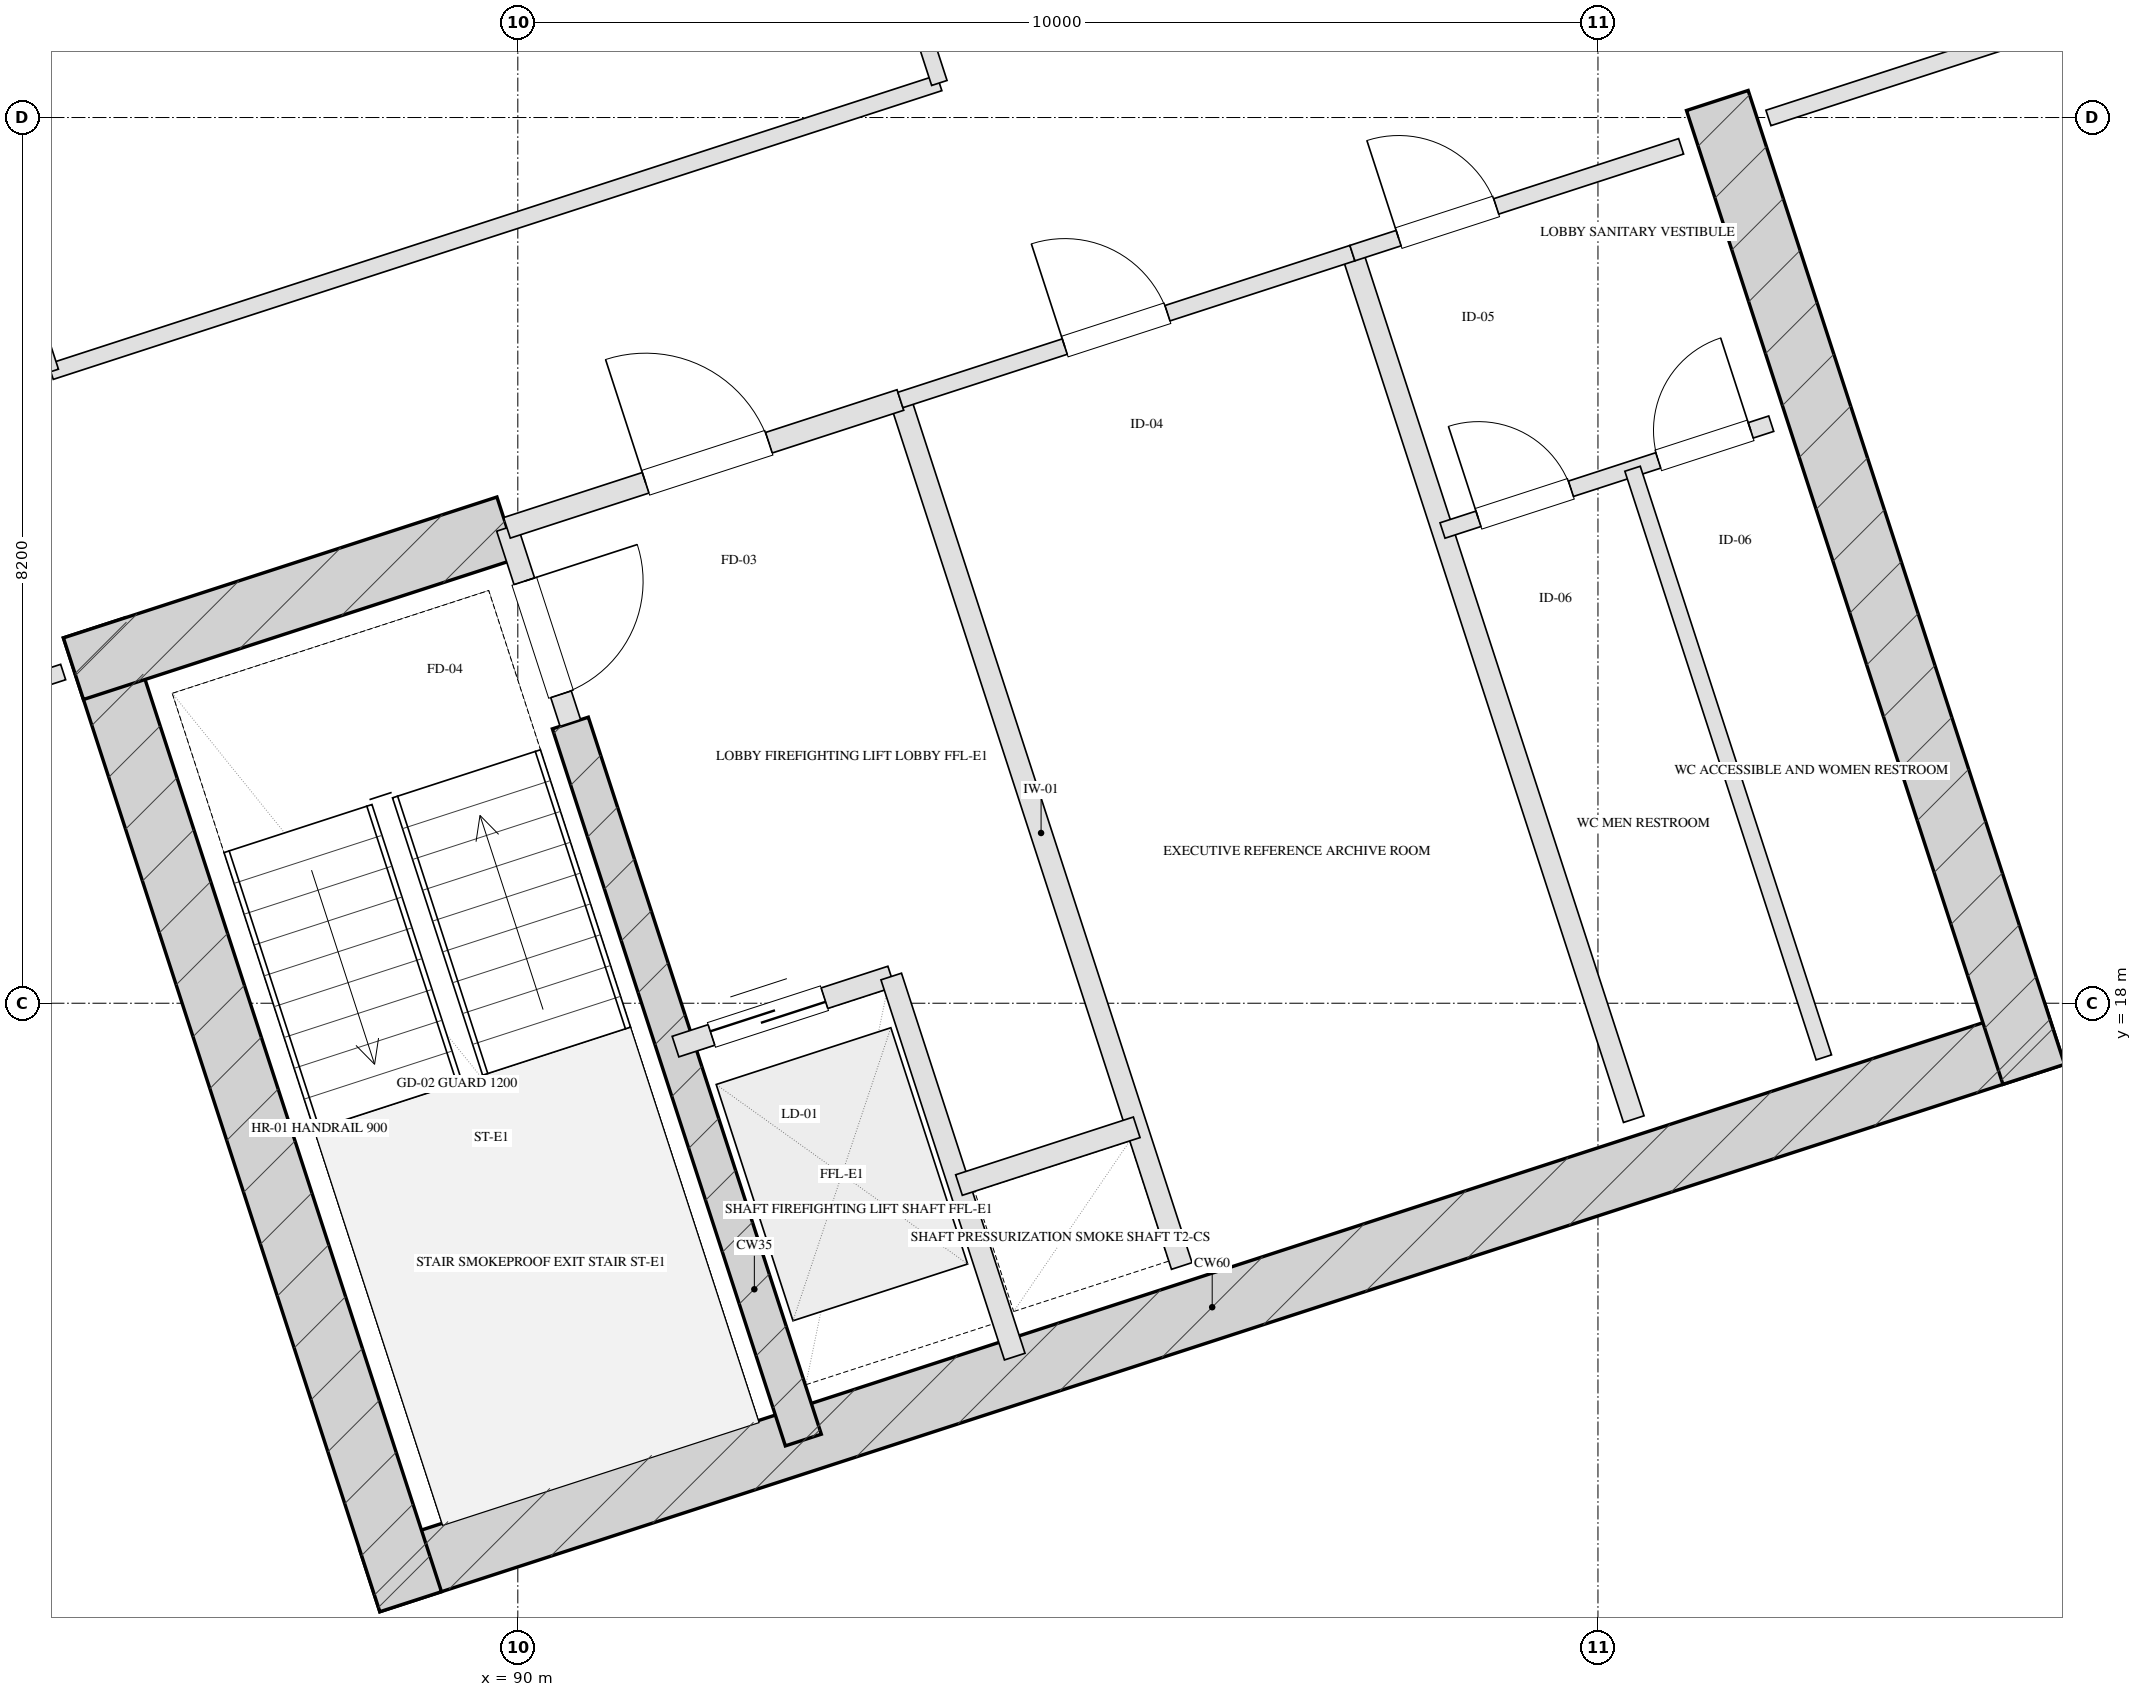
"""IFC4 building model, lengths in metres.
Left out: names, types, materials, properties, quantities, classifications, styles, units other than length and angle.
Written with IfcOpenShell. Run it as: python <this file> out.ifc"""

import sys

from ifc_helpers import new_model, si_unit, direction, frame, frame_2d, origin, place, context, subcontext, project, spatial, rectangle, extrude, element, fill, save


model = new_model("IFC4")
c1 = context("Model", 3, precision=1e-05, world=origin(), true_north=direction((0.0, 1.0)))
c2 = subcontext(c1, "Body", "Model", "MODEL_VIEW")
j1 = project(units=[si_unit("LENGTHUNIT", "METRE"), si_unit("PLANEANGLEUNIT", "RADIAN")], contexts=[c1])
p1 = place(None, origin())
s1 = spatial("IfcSite", under=j1, at=p1, CompositionType="ELEMENT")
p2 = place(p1, origin())
s2 = spatial("IfcBuilding", under=s1, at=p2, CompositionType="ELEMENT")
p3 = place(p2, frame((0.0, 0.0, 96.6)))
s3 = spatial("IfcBuildingStorey", under=s2, at=p3, CompositionType="ELEMENT", Elevation=96.6)
p4 = place(p3, frame((88.63, 12.652, 0.0), z_axis=(0.0, 0.0, 1.0), x_axis=(0.95105714907, 0.309015046886, 0.0)))
e1 = element("IfcWall", 1, at=p4, inside=s3, PredefinedType="SHEAR", context=c2, shape_type="SweptSolid", body=[
    extrude(rectangle(XDim=16.4, YDim=0.6, at=frame_2d((8.2, 0.0))), origin(), (0.0, 0.0, 1.0), 3.45),
])
p5 = place(p3, frame((86.078, 21.475, 0.0), z_axis=(0.0, 0.0, 1.0), x_axis=(0.309017938678, -0.951056209472, 0.0)))
e2 = element("IfcWall", 2, at=p5, inside=s3, PredefinedType="SHEAR", context=c2, shape_type="SweptSolid", body=[
    extrude(rectangle(XDim=9.48, YDim=0.6, at=frame_2d((4.74, 0.0))), origin(), (0.0, 0.0, 1.0), 3.45),
])
p6 = place(p3, frame((101.105, 26.358, 0.0), z_axis=(0.0, 0.0, 1.0), x_axis=(0.309010370028, -0.95105866865, 0.0)))
e3 = element("IfcWall", 3, at=p6, inside=s3, PredefinedType="SHEAR", context=c2, shape_type="SweptSolid", body=[
    extrude(rectangle(XDim=9.48, YDim=0.6, at=frame_2d((4.74, 0.0))), origin(), (0.0, 0.0, 1.0), 3.45),
])
p7 = place(p3, frame((90.486, 20.594, 0.0), z_axis=(0.0, 0.0, 1.0), x_axis=(0.309020428229, -0.951055400562, 0.0)))
e4 = element("IfcWall", 4, at=p7, inside=s3, PredefinedType="SHEAR", context=c2, shape_type="SweptSolid", body=[
    extrude(rectangle(XDim=6.98, YDim=0.35, at=frame_2d((3.49, 0.0))), origin(), (0.0, 0.0, 1.0), 3.45),
])
p8 = place(p3, frame((85.886, 21.097, 0.0), z_axis=(0.0, 0.0, 1.0), x_axis=(0.951068073652, 0.308981422225, 0.0)))
e5 = element("IfcWall", 5, at=p8, inside=s3, PredefinedType="SHEAR", context=c2, shape_type="SweptSolid", body=[
    extrude(rectangle(XDim=4.22, YDim=0.6, at=frame_2d((2.11, 0.0))), origin(), (0.0, 0.0, 1.0), 3.45),
])
p9 = place(p3, frame((99.284, 61.41, 0.0), z_axis=(0.0, 0.0, 1.0), x_axis=(0.309017542002, -0.95105633836, 0.0)))
e6 = element("IfcWall", 6, at=p9, inside=s3, PredefinedType="SOLIDWALL", context=c2, shape_type="SweptSolid", body=[
    extrude(rectangle(XDim=46.4, YDim=0.4, at=frame_2d((23.2, 0.0))), origin(), (0.0, 0.0, 1.0), 2.55),
])
p10 = place(p3, frame((111.953, 14.005, 0.0), z_axis=(0.0, 0.0, 1.0), x_axis=(-0.95105505922, -0.309021478754, 0.0)))
e7 = element("IfcWall", 7, at=p10, inside=s3, PredefinedType="SOLIDWALL", context=c2, shape_type="SweptSolid", body=[
    extrude(rectangle(XDim=29.4, YDim=0.4, at=frame_2d((14.7, 0.0))), origin(), (0.0, 0.0, 1.0), 2.55),
])
p11 = place(p3, frame((89.899, 22.401, 0.0), z_axis=(0.0, 0.0, 1.0), x_axis=(0.308932062672, -0.951084108086, 0.0)))
e8 = element("IfcWall", 8, at=p11, inside=s3, PredefinedType="PARTITIONING", context=c2, shape_type="SweptSolid", body=[
    extrude(rectangle(XDim=1.9, YDim=0.2, at=frame_2d((0.95, 0.0))), origin(), (0.0, 0.0, 1.0), 3.155),
])
p12 = place(p11, frame((0.52, 0.0, 0.0)))
e9 = element("IfcOpeningElement", 9, at=p12, cuts=e8, PredefinedType="OPENING", context=c2, shape_type="SweptSolid", body=[
    extrude(rectangle(XDim=1.1, YDim=2.05, at=frame_2d((0.55, 1.025))), frame((0.0, 0.11, 0.0), z_axis=(0.0, -1.0, 0.0), x_axis=(1.0, 0.0, 0.0)), (0.0, 0.0, 1.0), 0.22),
])
p13 = place(p3, frame((93.542, 23.585, 0.0), z_axis=(0.0, 0.0, 1.0), x_axis=(0.309042196757, -0.951048327176, 0.0)))
e10 = element("IfcWall", 10, at=p13, inside=s3, PredefinedType="PARTITIONING", context=c2, shape_type="SweptSolid", body=[
    extrude(rectangle(XDim=8.43, YDim=0.2, at=frame_2d((4.215, 0.0))), origin(), (0.0, 0.0, 1.0), 3.155),
])
p14 = place(p3, frame((89.899, 22.401, 0.0), z_axis=(0.0, 0.0, 1.0), x_axis=(0.951046716504, 0.309047153403, 0.0)))
e11 = element("IfcWall", 11, at=p14, inside=s3, PredefinedType="PARTITIONING", context=c2, shape_type="SweptSolid", body=[
    extrude(rectangle(XDim=3.83, YDim=0.2, at=frame_2d((1.915, 0.0))), origin(), (0.0, 0.0, 1.0), 3.155),
])
p15 = place(p14, frame((1.35, 0.0, 0.0)))
e12 = element("IfcOpeningElement", 12, at=p15, cuts=e11, PredefinedType="OPENING", context=c2, shape_type="SweptSolid", body=[
    extrude(rectangle(XDim=1.2, YDim=2.05, at=frame_2d((0.6, 1.025))), frame((0.0, 0.11, 0.0), z_axis=(0.0, -1.0, 0.0), x_axis=(1.0, 0.0, 0.0)), (0.0, 0.0, 1.0), 0.22),
])
p16 = place(p3, frame((91.46, 17.598, 0.0), z_axis=(0.0, 0.0, 1.0), x_axis=(0.951062257173, 0.308999325213, 0.0)))
e13 = element("IfcWall", 13, at=p16, inside=s3, PredefinedType="PARTITIONING", context=c2, shape_type="SweptSolid", body=[
    extrude(rectangle(XDim=2.1, YDim=0.2, at=frame_2d((1.05, 0.0))), origin(), (0.0, 0.0, 1.0), 3.155),
])
p17 = place(p16, frame((0.35, 0.0, 0.0)))
e14 = element("IfcOpeningElement", 14, at=p17, cuts=e13, PredefinedType="OPENING", context=c2, shape_type="SweptSolid", body=[
    extrude(rectangle(XDim=1.1, YDim=2.05, at=frame_2d((0.55, 1.025))), frame((0.0, 0.11, 0.0), z_axis=(0.0, -1.0, 0.0), x_axis=(1.0, 0.0, 0.0)), (0.0, 0.0, 1.0), 0.22),
])
p18 = place(p3, frame((93.457, 18.247, 0.0), z_axis=(0.0, 0.0, 1.0), x_axis=(0.3089935693, -0.951064127245, 0.0)))
e15 = element("IfcWall", 15, at=p18, inside=s3, PredefinedType="PARTITIONING", context=c2, shape_type="SweptSolid", body=[
    extrude(rectangle(XDim=3.7, YDim=0.2, at=frame_2d((1.85, 0.0))), origin(), (0.0, 0.0, 1.0), 3.155),
])
p19 = place(p3, frame((94.084, 16.317, 0.0), z_axis=(0.0, 0.0, 1.0), x_axis=(0.951041328149, 0.309063734775, 0.0)))
e16 = element("IfcWall", 16, at=p19, inside=s3, PredefinedType="PARTITIONING", context=c2, shape_type="SweptSolid", body=[
    extrude(rectangle(XDim=1.73, YDim=0.2, at=frame_2d((0.865, 0.0))), origin(), (0.0, 0.0, 1.0), 3.155),
])
p20 = place(p3, frame((97.727, 24.944, 0.0), z_axis=(0.0, 0.0, 1.0), x_axis=(0.309016001439, -0.951056838919, 0.0)))
e17 = element("IfcWall", 17, at=p20, inside=s3, PredefinedType="PARTITIONING", context=c2, shape_type="SweptSolid", body=[
    extrude(rectangle(XDim=8.43, YDim=0.2, at=frame_2d((4.215, 0.0))), origin(), (0.0, 0.0, 1.0), 3.155),
])
p21 = place(p3, frame((93.542, 23.585, 0.0), z_axis=(0.0, 0.0, 1.0), x_axis=(0.951063829732, 0.308994485023, 0.0)))
e18 = element("IfcWall", 18, at=p21, inside=s3, PredefinedType="PARTITIONING", context=c2, shape_type="SweptSolid", body=[
    extrude(rectangle(XDim=4.4, YDim=0.15, at=frame_2d((2.2, 0.0))), origin(), (0.0, 0.0, 1.0), 3.155),
])
p22 = place(p21, frame((1.6, 0.0, 0.0)))
e19 = element("IfcOpeningElement", 19, at=p22, cuts=e18, PredefinedType="OPENING", context=c2, shape_type="SweptSolid", body=[
    extrude(rectangle(XDim=1.0, YDim=2.05, at=frame_2d((0.5, 1.025))), frame((0.0, 0.085, 0.0), z_axis=(0.0, -1.0, 0.0), x_axis=(1.0, 0.0, 0.0)), (0.0, 0.0, 1.0), 0.17),
])
p23 = place(p3, frame((97.727, 24.944, 0.0), z_axis=(0.0, 0.0, 1.0), x_axis=(0.951036872128, 0.309077446369, 0.0)))
e20 = element("IfcWall", 20, at=p23, inside=s3, PredefinedType="PARTITIONING", context=c2, shape_type="SweptSolid", body=[
    extrude(rectangle(XDim=3.2, YDim=0.15, at=frame_2d((1.6, 0.0))), origin(), (0.0, 0.0, 1.0), 3.155),
])
p24 = place(p23, frame((0.45, 0.0, 0.0)))
e21 = element("IfcOpeningElement", 21, at=p24, cuts=e20, PredefinedType="OPENING", context=c2, shape_type="SweptSolid", body=[
    extrude(rectangle(XDim=0.95, YDim=2.05, at=frame_2d((0.475, 1.025))), frame((0.0, 0.085, 0.0), z_axis=(0.0, -1.0, 0.0), x_axis=(1.0, 0.0, 0.0)), (0.0, 0.0, 1.0), 0.17),
])
p25 = place(p3, frame((98.561, 22.376, 0.0), z_axis=(0.0, 0.0, 1.0), x_axis=(0.95104415986, 0.309055020985, 0.0)))
e22 = element("IfcWall", 22, at=p25, inside=s3, PredefinedType="PARTITIONING", context=c2, shape_type="SweptSolid", body=[
    extrude(rectangle(XDim=3.2, YDim=0.15, at=frame_2d((1.6, 0.0))), origin(), (0.0, 0.0, 1.0), 3.155),
])
p26 = place(p25, frame((0.35, 0.0, 0.0)))
e23 = element("IfcOpeningElement", 23, at=p26, cuts=e22, PredefinedType="OPENING", context=c2, shape_type="SweptSolid", body=[
    extrude(rectangle(XDim=0.9, YDim=2.05, at=frame_2d((0.45, 1.025))), frame((0.0, 0.085, 0.0), z_axis=(0.0, -1.0, 0.0), x_axis=(1.0, 0.0, 0.0)), (0.0, 0.0, 1.0), 0.17),
])
p27 = place(p25, frame((2.1, 0.0, 0.0)))
e24 = element("IfcOpeningElement", 24, at=p27, cuts=e22, PredefinedType="OPENING", context=c2, shape_type="SweptSolid", body=[
    extrude(rectangle(XDim=0.9, YDim=2.05, at=frame_2d((0.45, 1.025))), frame((0.0, 0.085, 0.0), z_axis=(0.0, -1.0, 0.0), x_axis=(1.0, 0.0, 0.0)), (0.0, 0.0, 1.0), 0.17),
])
p28 = place(p3, frame((100.32, 22.948, 0.0), z_axis=(0.0, 0.0, 1.0), x_axis=(0.309035009867, -0.951050662518, 0.0)))
e25 = element("IfcWall", 25, at=p28, inside=s3, PredefinedType="PARTITIONING", context=c2, shape_type="SweptSolid", body=[
    extrude(rectangle(XDim=5.73, YDim=0.15, at=frame_2d((2.865, 0.0))), origin(), (0.0, 0.0, 1.0), 3.155),
])
p29 = place(p3, frame((77.136, 18.254, 0.0), z_axis=(0.0, 0.0, 1.0), x_axis=(0.951057133767, 0.309015093986, 0.0)))
e26 = element("IfcWall", 26, at=p29, inside=s3, PredefinedType="PARTITIONING", context=c2, shape_type="SweptSolid", body=[
    extrude(rectangle(XDim=9.1, YDim=0.15, at=frame_2d((4.55, 0.0))), origin(), (0.0, 0.0, 1.0), 3.155),
])
p30 = place(p29, frame((3.822, 0.0, 0.0)))
e27 = element("IfcOpeningElement", 27, at=p30, cuts=e26, PredefinedType="OPENING", context=c2, shape_type="SweptSolid", body=[
    extrude(rectangle(XDim=1.0, YDim=2.05, at=frame_2d((0.5, 1.025))), frame((0.0, 0.085, 0.0), z_axis=(0.0, -1.0, 0.0), x_axis=(1.0, 0.0, 0.0)), (0.0, 0.0, 1.0), 0.17),
])
p31 = place(p3, frame((101.578, 26.196, 0.0), z_axis=(0.0, 0.0, 1.0), x_axis=(0.951062770994, 0.308997743729, 0.0)))
e28 = element("IfcWall", 28, at=p31, inside=s3, PredefinedType="PARTITIONING", context=c2, shape_type="SweptSolid", body=[
    extrude(rectangle(XDim=8.5, YDim=0.15, at=frame_2d((4.25, 0.0))), origin(), (0.0, 0.0, 1.0), 3.155),
])
p32 = place(p31, frame((3.57, 0.0, 0.0)))
e29 = element("IfcOpeningElement", 29, at=p32, cuts=e28, PredefinedType="OPENING", context=c2, shape_type="SweptSolid", body=[
    extrude(rectangle(XDim=1.0, YDim=2.05, at=frame_2d((0.5, 1.025))), frame((0.0, 0.085, 0.0), z_axis=(0.0, -1.0, 0.0), x_axis=(1.0, 0.0, 0.0)), (0.0, 0.0, 1.0), 0.17),
])
p33 = place(p3, frame((85.676, 23.847, 0.0), z_axis=(0.0, 0.0, 1.0), x_axis=(0.951063309554, 0.308996086091, 0.0)))
e30 = element("IfcWall", 30, at=p33, inside=s3, PredefinedType="PARTITIONING", context=c2, shape_type="SweptSolid", body=[
    extrude(rectangle(XDim=8.65, YDim=0.15, at=frame_2d((4.325, 0.0))), origin(), (0.0, 0.0, 1.0), 3.155),
])
p34 = place(p3, frame((85.676, 23.847, 0.0), z_axis=(0.0, 0.0, 1.0), x_axis=(-0.309008771245, 0.951059188113, 0.0)))
e31 = element("IfcWall", 31, at=p34, inside=s3, PredefinedType="PARTITIONING", context=c2, shape_type="SweptSolid", body=[
    extrude(rectangle(XDim=16.64, YDim=0.15, at=frame_2d((8.32, 0.0))), origin(), (0.0, 0.0, 1.0), 3.155),
])
p35 = place(p34, frame((7.987, 0.0, 0.0)))
e32 = element("IfcOpeningElement", 32, at=p35, cuts=e31, PredefinedType="OPENING", context=c2, shape_type="SweptSolid", body=[
    extrude(rectangle(XDim=1.1, YDim=2.05, at=frame_2d((0.55, 1.025))), frame((0.0, 0.085, 0.0), z_axis=(0.0, -1.0, 0.0), x_axis=(1.0, 0.0, 0.0)), (0.0, 0.0, 1.0), 0.17),
])
p36 = place(p3, frame((93.903, 26.52, 0.0), z_axis=(0.0, 0.0, 1.0), x_axis=(-0.30901773025, 0.951056277195, 0.0)))
e33 = element("IfcWall", 33, at=p36, inside=s3, PredefinedType="PARTITIONING", context=c2, shape_type="SweptSolid", body=[
    extrude(rectangle(XDim=16.64, YDim=0.15, at=frame_2d((8.32, 0.0))), origin(), (0.0, 0.0, 1.0), 3.155),
])
p37 = place(p12, origin())
e34 = element("IfcDoor", 34, at=p37, inside=s3, OperationType="SINGLE_SWING_LEFT", PredefinedType="DOOR", context=c2, shape_type="SweptSolid", body=[
    extrude(rectangle(XDim=1.1, YDim=2.05, at=frame_2d((0.55, 1.025))), frame((0.0, 0.025, 0.0), z_axis=(0.0, -1.0, 0.0), x_axis=(1.0, 0.0, 0.0)), (0.0, 0.0, 1.0), 0.05),
])
fill(e9, e34)
p38 = place(p15, origin())
e35 = element("IfcDoor", 35, at=p38, inside=s3, OperationType="SINGLE_SWING_LEFT", PredefinedType="DOOR", context=c2, shape_type="SweptSolid", body=[
    extrude(rectangle(XDim=1.2, YDim=2.05, at=frame_2d((0.6, 1.025))), frame((0.0, 0.025, 0.0), z_axis=(0.0, -1.0, 0.0), x_axis=(1.0, 0.0, 0.0)), (0.0, 0.0, 1.0), 0.05),
])
fill(e12, e35)
p39 = place(p17, origin())
e36 = element("IfcDoor", 36, at=p39, inside=s3, OperationType="DOUBLE_DOOR_SLIDING", PredefinedType="DOOR", context=c2, shape_type="SweptSolid", body=[
    extrude(rectangle(XDim=1.1, YDim=2.05, at=frame_2d((0.55, 1.025))), frame((0.0, 0.025, 0.0), z_axis=(0.0, -1.0, 0.0), x_axis=(1.0, 0.0, 0.0)), (0.0, 0.0, 1.0), 0.05),
])
fill(e14, e36)
p40 = place(p22, origin())
e37 = element("IfcDoor", 37, at=p40, inside=s3, OperationType="SINGLE_SWING_LEFT", PredefinedType="DOOR", context=c2, shape_type="SweptSolid", body=[
    extrude(rectangle(XDim=1.0, YDim=2.05, at=frame_2d((0.5, 1.025))), frame((0.0, 0.025, 0.0), z_axis=(0.0, -1.0, 0.0), x_axis=(1.0, 0.0, 0.0)), (0.0, 0.0, 1.0), 0.05),
])
fill(e19, e37)
p41 = place(p24, origin())
e38 = element("IfcDoor", 38, at=p41, inside=s3, OperationType="SINGLE_SWING_LEFT", PredefinedType="DOOR", context=c2, shape_type="SweptSolid", body=[
    extrude(rectangle(XDim=0.95, YDim=2.05, at=frame_2d((0.475, 1.025))), frame((0.0, 0.025, 0.0), z_axis=(0.0, -1.0, 0.0), x_axis=(1.0, 0.0, 0.0)), (0.0, 0.0, 1.0), 0.05),
])
fill(e21, e38)
p42 = place(p26, origin())
e39 = element("IfcDoor", 39, at=p42, inside=s3, OperationType="SINGLE_SWING_LEFT", PredefinedType="DOOR", context=c2, shape_type="SweptSolid", body=[
    extrude(rectangle(XDim=0.9, YDim=2.05, at=frame_2d((0.45, 1.025))), frame((0.0, 0.025, 0.0), z_axis=(0.0, -1.0, 0.0), x_axis=(1.0, 0.0, 0.0)), (0.0, 0.0, 1.0), 0.05),
])
fill(e23, e39)
p43 = place(p27, origin())
e40 = element("IfcDoor", 40, at=p43, inside=s3, OperationType="SINGLE_SWING_RIGHT", PredefinedType="DOOR", context=c2, shape_type="SweptSolid", body=[
    extrude(rectangle(XDim=0.9, YDim=2.05, at=frame_2d((0.45, 1.025))), frame((0.0, 0.025, 0.0), z_axis=(0.0, -1.0, 0.0), x_axis=(1.0, 0.0, 0.0)), (0.0, 0.0, 1.0), 0.05),
])
fill(e24, e40)
save(model, sys.argv[1])
